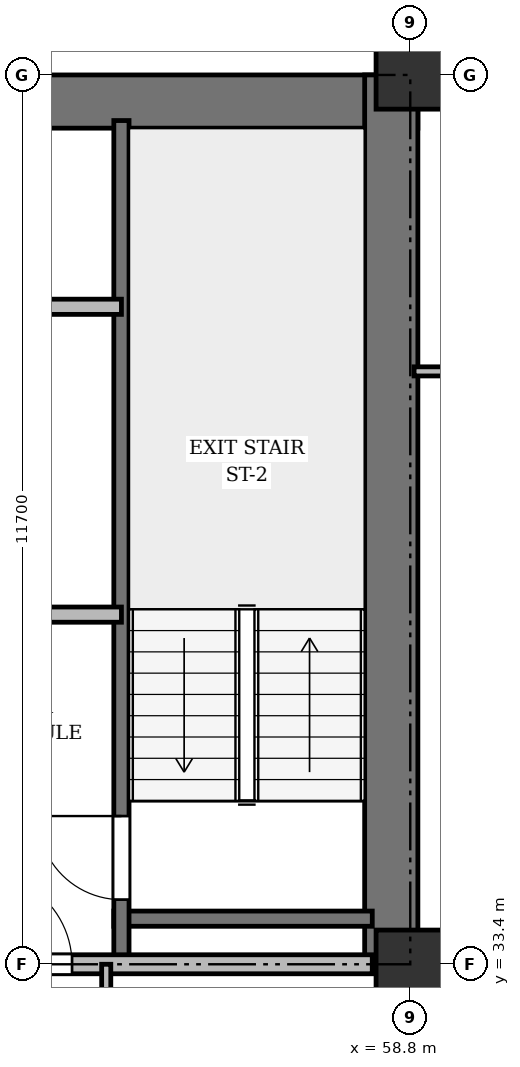
"""IFC4 building model, lengths in metres.
Left out: names, types, materials, properties, quantities, classifications, styles, units other than length and angle.
Written with IfcOpenShell. Run it as: python <this file> out.ifc"""

import sys

from ifc_helpers import new_model, si_unit, direction, frame, frame_2d, origin, origin_2d, place, context, subcontext, project, spatial, rectangle, extrude, source, transform, mapped, element, fill, save


model = new_model("IFC4")
c1 = context("Model", 3, precision=1e-05, world=origin(), true_north=direction((0.0, 1.0)))
c2 = subcontext(c1, "Body", "Model", "MODEL_VIEW")
j1 = project(units=[si_unit("LENGTHUNIT", "METRE"), si_unit("PLANEANGLEUNIT", "RADIAN")], contexts=[c1])
p1 = place(None, origin())
s1 = spatial("IfcSite", under=j1, at=p1, CompositionType="ELEMENT")
p2 = place(p1, origin())
s2 = spatial("IfcBuilding", under=s1, at=p2, CompositionType="ELEMENT")
p3 = place(p2, frame((0.0, 0.0, 66.7)))
s3 = spatial("IfcBuildingStorey", under=s2, at=p3, CompositionType="ELEMENT", Elevation=66.7)
m1 = source(origin(), c2, "Body", "SweptSolid", [
    extrude(rectangle(XDim=0.9, YDim=0.9, at=origin_2d()), origin(), (0.0, 0.0, 1.0), 3.6),
])
for number, where, z_axis, x_axis in (
    (1, (58.8, 33.4, 0.0), (0.0, 0.0, 1.0), (1.0, 0.0, 0.0)),
    (2, (58.8, 45.1, 0.0), (0.0, 0.0, 1.0), (1.0, 0.0, 0.0)),
):
    element("IfcColumn", number, at=place(p3, frame(where, z_axis=z_axis, x_axis=x_axis)), inside=s3, PredefinedType="COLUMN", context=c2, shape_type="MappedRepresentation", body=[
        mapped(m1, transform((0.0, 0.0, 0.0), x_axis=(1.0, 0.0, 0.0), y_axis=(0.0, 1.0, 0.0), z_axis=(0.0, 0.0, 1.0), scale=1.0)),
    ])
p4 = place(p3, frame((15.5, 44.75, 0.0), z_axis=(0.0, 0.0, 1.0), x_axis=(1.0, 0.0, 0.0)))
e3 = element("IfcWall", 3, at=p4, inside=s3, PredefinedType="SHEAR", context=c2, shape_type="SweptSolid", body=[
    extrude(rectangle(XDim=43.4, YDim=0.7, at=frame_2d((21.7, 0.0))), origin(), (0.0, 0.0, 1.0), 3.34),
])
p5 = place(p3, frame((58.55, 33.4, 0.0), z_axis=(0.0, 0.0, 1.0), x_axis=(0.0, 1.0, 0.0)))
e4 = element("IfcWall", 4, at=p5, inside=s3, PredefinedType="SHEAR", context=c2, shape_type="SweptSolid", body=[
    extrude(rectangle(XDim=11.7, YDim=0.7, at=frame_2d((5.85, 0.0))), origin(), (0.0, 0.0, 1.0), 3.34),
])
p6 = place(p3, frame((54.9, 34.0, 0.0), z_axis=(0.0, 0.0, 1.0), x_axis=(1.0, 0.0, 0.0)))
e5 = element("IfcWall", 5, at=p6, inside=s3, PredefinedType="SHEAR", context=c2, shape_type="SweptSolid", body=[
    extrude(rectangle(XDim=3.4, YDim=0.2, at=frame_2d((1.7, 0.0))), origin(), (0.0, 0.0, 1.0), 3.34),
])
p7 = place(p3, frame((55.0, 33.4, 0.0), z_axis=(0.0, 0.0, 1.0), x_axis=(0.0, 1.0, 0.0)))
e6 = element("IfcWall", 6, at=p7, inside=s3, PredefinedType="SHEAR", context=c2, shape_type="SweptSolid", body=[
    extrude(rectangle(XDim=11.1, YDim=0.2, at=frame_2d((5.55, 0.0))), origin(), (0.0, 0.0, 1.0), 3.34),
])
p8 = place(p7, frame((0.85, 0.0, 0.0)))
e7 = element("IfcOpeningElement", 7, at=p8, cuts=e6, PredefinedType="OPENING", context=c2, shape_type="SweptSolid", body=[
    extrude(rectangle(XDim=1.1, YDim=2.15, at=frame_2d((0.55, 1.075))), frame((0.0, 0.11, 0.0), z_axis=(0.0, -1.0, 0.0), x_axis=(1.0, 0.0, 0.0)), (0.0, 0.0, 1.0), 0.22),
])
p9 = place(p3, frame((47.15, 42.05, 0.0), z_axis=(0.0, 0.0, 1.0), x_axis=(1.0, 0.0, 0.0)))
e8 = element("IfcWall", 8, at=p9, inside=s3, PredefinedType="SOLIDWALL", context=c2, shape_type="SweptSolid", body=[
    extrude(rectangle(XDim=7.85, YDim=0.2, at=frame_2d((3.925, 0.0))), origin(), (0.0, 0.0, 1.0), 2.752),
])
p10 = place(p9, frame((0.75, 0.0, 0.0)))
e9 = element("IfcOpeningElement", 9, at=p10, cuts=e8, PredefinedType="OPENING", context=c2, shape_type="SweptSolid", body=[
    extrude(rectangle(XDim=0.9, YDim=2.1, at=frame_2d((0.45, 1.05))), frame((0.0, 0.11, 0.0), z_axis=(0.0, -1.0, 0.0), x_axis=(1.0, 0.0, 0.0)), (0.0, 0.0, 1.0), 0.22),
])
p11 = place(p9, frame((3.85, 0.0, 0.0)))
e10 = element("IfcOpeningElement", 10, at=p11, cuts=e8, PredefinedType="OPENING", context=c2, shape_type="SweptSolid", body=[
    extrude(rectangle(XDim=0.9, YDim=2.1, at=frame_2d((0.45, 1.05))), frame((0.0, 0.11, 0.0), z_axis=(0.0, -1.0, 0.0), x_axis=(1.0, 0.0, 0.0)), (0.0, 0.0, 1.0), 0.22),
])
p12 = place(p3, frame((52.45, 38.0, 0.0), z_axis=(0.0, 0.0, 1.0), x_axis=(1.0, 0.0, 0.0)))
e11 = element("IfcWall", 11, at=p12, inside=s3, PredefinedType="PARTITIONING", context=c2, shape_type="SweptSolid", body=[
    extrude(rectangle(XDim=2.55, YDim=0.2, at=frame_2d((1.275, 0.0))), origin(), (0.0, 0.0, 1.0), 3.34),
])
p13 = place(p3, frame((47.15, 33.4, 0.0), z_axis=(0.0, 0.0, 1.0), x_axis=(1.0, 0.0, 0.0)))
e12 = element("IfcWall", 12, at=p13, inside=s3, PredefinedType="PARTITIONING", context=c2, shape_type="SweptSolid", body=[
    extrude(rectangle(XDim=11.15, YDim=0.25, at=frame_2d((5.575, 0.0))), origin(), (0.0, 0.0, 1.0), 2.69),
])
p14 = place(p13, frame((0.7, 0.0, 0.0)))
e13 = element("IfcOpeningElement", 13, at=p14, cuts=e12, PredefinedType="OPENING", context=c2, shape_type="SweptSolid", body=[
    extrude(rectangle(XDim=0.95, YDim=2.15, at=frame_2d((0.475, 1.075))), frame((0.0, 0.135, 0.0), z_axis=(0.0, -1.0, 0.0), x_axis=(1.0, 0.0, 0.0)), (0.0, 0.0, 1.0), 0.27),
])
p15 = place(p13, frame((6.0, 0.0, 0.0)))
e14 = element("IfcOpeningElement", 14, at=p15, cuts=e12, PredefinedType="OPENING", context=c2, shape_type="SweptSolid", body=[
    extrude(rectangle(XDim=1.2, YDim=2.15, at=frame_2d((0.6, 1.075))), frame((0.0, 0.135, 0.0), z_axis=(0.0, -1.0, 0.0), x_axis=(1.0, 0.0, 0.0)), (0.0, 0.0, 1.0), 0.27),
])
p16 = place(p3, frame((54.8, 29.8, 0.0), z_axis=(0.0, 0.0, 1.0), x_axis=(0.0, 1.0, 0.0)))
e15 = element("IfcWall", 15, at=p16, inside=s3, PredefinedType="PARTITIONING", context=c2, shape_type="SweptSolid", body=[
    extrude(rectangle(XDim=3.6, YDim=0.12, at=frame_2d((1.8, 0.0))), origin(), (0.0, 0.0, 1.0), 2.69),
])
p17 = place(p3, frame((58.85, 41.2, 0.0), z_axis=(0.0, 0.0, 1.0), x_axis=(1.0, 0.0, 0.0)))
e16 = element("IfcWall", 16, at=p17, inside=s3, PredefinedType="PARTITIONING", context=c2, shape_type="SweptSolid", body=[
    extrude(rectangle(XDim=10.75, YDim=0.12, at=frame_2d((5.375, 0.0))), origin(), (0.0, 0.0, 1.0), 2.752),
])
p18 = place(p17, frame((4.9, 0.0, 0.0)))
e17 = element("IfcOpeningElement", 17, at=p18, cuts=e16, PredefinedType="OPENING", context=c2, shape_type="SweptSolid", body=[
    extrude(rectangle(XDim=0.95, YDim=2.15, at=frame_2d((0.475, 1.075))), frame((0.0, 0.07, 0.0), z_axis=(0.0, -1.0, 0.0), x_axis=(1.0, 0.0, 0.0)), (0.0, 0.0, 1.0), 0.14),
])
p19 = place(p3, frame((58.8, 33.4, 0.0), z_axis=(0.0, 0.0, 1.0), x_axis=(1.0, 0.0, 0.0)))
e18 = element("IfcWall", 18, at=p19, inside=s3, PredefinedType="PARTITIONING", context=c2, shape_type="SweptSolid", body=[
    extrude(rectangle(XDim=10.85, YDim=0.15, at=frame_2d((5.425, 0.0))), origin(), (0.0, 0.0, 1.0), 2.69),
])
p20 = place(p19, frame((4.76, 0.0, 0.0)))
e19 = element("IfcOpeningElement", 19, at=p20, cuts=e18, PredefinedType="OPENING", context=c2, shape_type="SweptSolid", body=[
    extrude(rectangle(XDim=0.95, YDim=2.15, at=frame_2d((0.475, 1.075))), frame((0.0, 0.085, 0.0), z_axis=(0.0, -1.0, 0.0), x_axis=(1.0, 0.0, 0.0)), (0.0, 0.0, 1.0), 0.17),
])
p21 = place(p3, frame((58.8, 44.75, 0.0), z_axis=(0.0, 0.0, 1.0), x_axis=(0.0, 1.0, 0.0)))
e20 = element("IfcWall", 20, at=p21, inside=s3, PredefinedType="PARTITIONING", context=c2, shape_type="SweptSolid", body=[
    extrude(rectangle(XDim=3.61, YDim=0.15, at=frame_2d((1.805, 0.0))), origin(), (0.0, 0.0, 1.0), 2.752),
])
p22 = place(p21, frame((1.1, 0.0, 0.0)))
e21 = element("IfcOpeningElement", 21, at=p22, cuts=e20, PredefinedType="OPENING", context=c2, shape_type="SweptSolid", body=[
    extrude(rectangle(XDim=0.95, YDim=2.15, at=frame_2d((0.475, 1.075))), frame((0.0, 0.085, 0.0), z_axis=(0.0, -1.0, 0.0), x_axis=(1.0, 0.0, 0.0)), (0.0, 0.0, 1.0), 0.17),
])
m2 = source(origin(), c2, "Body", "SweptSolid", [
    extrude(rectangle(XDim=1.1, YDim=2.15, at=frame_2d((0.55, 1.075))), frame((0.0, 0.025, 0.0), z_axis=(0.0, -1.0, 0.0), x_axis=(1.0, 0.0, 0.0)), (0.0, 0.0, 1.0), 0.05),
])
p23 = place(p8, origin())
e22 = element("IfcDoor", 22, at=p23, inside=s3, OperationType="SINGLE_SWING_RIGHT", PredefinedType="DOOR", context=c2, shape_type="MappedRepresentation", body=[
    mapped(m2, transform((0.0, 0.0, 0.0), x_axis=(1.0, 0.0, 0.0), y_axis=(0.0, 1.0, 0.0), z_axis=(0.0, 0.0, 1.0), scale=1.0)),
])
fill(e7, e22)
m3 = source(origin(), c2, "Body", "SweptSolid", [
    extrude(rectangle(XDim=1.2, YDim=2.15, at=frame_2d((0.6, 1.075))), frame((0.0, 0.025, 0.0), z_axis=(0.0, -1.0, 0.0), x_axis=(1.0, 0.0, 0.0)), (0.0, 0.0, 1.0), 0.05),
])
p24 = place(p15, origin())
e23 = element("IfcDoor", 23, at=p24, inside=s3, OperationType="SINGLE_SWING_LEFT", PredefinedType="DOOR", context=c2, shape_type="MappedRepresentation", body=[
    mapped(m3, transform((0.0, 0.0, 0.0), x_axis=(1.0, 0.0, 0.0), y_axis=(0.0, 1.0, 0.0), z_axis=(0.0, 0.0, 1.0), scale=1.0)),
])
fill(e14, e23)
save(model, sys.argv[1])
